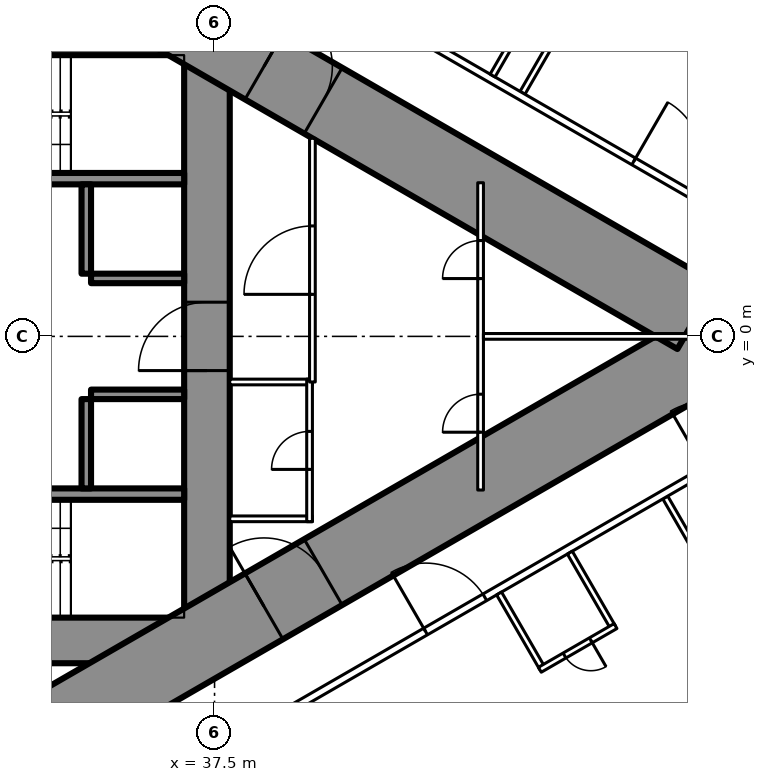
"""IFC4 building model, lengths in metres.
Left out: names, types, materials, properties, quantities, classifications, styles, units other than length and angle.
Written with IfcOpenShell. Run it as: python <this file> out.ifc"""

import sys

from ifc_helpers import new_model, si_unit, direction, frame, frame_2d, origin, place, context, subcontext, project, spatial, rectangle, extrude, element, fill, save


model = new_model("IFC4")
c1 = context("Model", 3, precision=1e-05, world=origin(), true_north=direction((0.0, 1.0)))
c2 = subcontext(c1, "Body", "Model", "MODEL_VIEW")
j1 = project(units=[si_unit("LENGTHUNIT", "METRE"), si_unit("PLANEANGLEUNIT", "RADIAN")], contexts=[c1])
p1 = place(None, origin())
s1 = spatial("IfcSite", under=j1, at=p1, CompositionType="ELEMENT")
p2 = place(p1, origin())
s2 = spatial("IfcBuilding", under=s1, at=p2, CompositionType="ELEMENT")
p3 = place(p2, frame((0.0, 0.0, 12.6)))
s3 = spatial("IfcBuildingStorey", under=s2, at=p3, CompositionType="ELEMENT", Elevation=12.6)
p4 = place(p3, frame((37.3, -8.6, 0.0), z_axis=(0.0, 0.0, 1.0), x_axis=(0.0, 1.0, 0.0)))
e1 = element("IfcWall", 1, at=p4, inside=s3, PredefinedType="SHEAR", context=c2, shape_type="SweptSolid", body=[
    extrude(rectangle(XDim=17.2, YDim=1.2, at=frame_2d((8.6, 0.0))), origin(), (0.0, 0.0, 1.0), 5.4),
])
p5 = place(p4, frame((7.7, 0.0, 0.0)))
e2 = element("IfcOpeningElement", 2, at=p5, cuts=e1, PredefinedType="OPENING", context=c2, shape_type="SweptSolid", body=[
    extrude(rectangle(XDim=1.8, YDim=2.2, at=frame_2d((0.9, 1.1))), frame((0.0, 0.61, 0.0), z_axis=(0.0, -1.0, 0.0), x_axis=(1.0, 0.0, 0.0)), (0.0, 0.0, 1.0), 1.22),
])
p6 = place(p3, frame((28.3, -8.0, 0.0), z_axis=(0.0, 0.0, 1.0), x_axis=(1.0, 0.0, 0.0)))
e3 = element("IfcWall", 3, at=p6, inside=s3, PredefinedType="SHEAR", context=c2, shape_type="SweptSolid", body=[
    extrude(rectangle(XDim=8.4, YDim=1.2, at=frame_2d((4.2, 0.0))), origin(), (0.0, 0.0, 1.0), 5.4),
])
p7 = place(p6, frame((0.25, 0.0, 0.0)))
e4 = element("IfcOpeningElement", 4, at=p7, cuts=e3, PredefinedType="OPENING", context=c2, shape_type="SweptSolid", body=[
    extrude(rectangle(XDim=1.0, YDim=2.2, at=frame_2d((0.5, 1.1))), frame((0.0, 0.61, 0.0), z_axis=(0.0, -1.0, 0.0), x_axis=(1.0, 0.0, 0.0)), (0.0, 0.0, 1.0), 1.22),
])
p8 = place(p3, frame((28.3, 8.0, 0.0), z_axis=(0.0, 0.0, 1.0), x_axis=(1.0, 0.0, 0.0)))
e5 = element("IfcWall", 5, at=p8, inside=s3, PredefinedType="SHEAR", context=c2, shape_type="SweptSolid", body=[
    extrude(rectangle(XDim=8.4, YDim=1.2, at=frame_2d((4.2, 0.0))), origin(), (0.0, 0.0, 1.0), 5.4),
])
p9 = place(p8, frame((0.25, 0.0, 0.0)))
e6 = element("IfcOpeningElement", 6, at=p9, cuts=e5, PredefinedType="OPENING", context=c2, shape_type="SweptSolid", body=[
    extrude(rectangle(XDim=1.0, YDim=2.2, at=frame_2d((0.5, 1.1))), frame((0.0, 0.61, 0.0), z_axis=(0.0, -1.0, 0.0), x_axis=(1.0, 0.0, 0.0)), (0.0, 0.0, 1.0), 1.22),
])
for number, where, z_axis, x_axis in (
    (7, (28.3, -4.15, 0.0), (0.0, 0.0, 1.0), (1.0, 0.0, 0.0)),
    (8, (28.3, 4.15, 0.0), (0.0, 0.0, 1.0), (1.0, 0.0, 0.0)),
):
    element("IfcWall", number, at=place(p3, frame(where, z_axis=z_axis, x_axis=x_axis)), inside=s3, PredefinedType="SHEAR", context=c2, shape_type="SweptSolid", body=[
        extrude(rectangle(XDim=8.4, YDim=0.3, at=frame_2d((4.2, 0.0))), origin(), (0.0, 0.0, 1.0), 5.4),
    ])
p10 = place(p3, frame((34.125, -4.0, 0.0), z_axis=(0.0, 0.0, 1.0), x_axis=(0.0, 1.0, 0.0)))
e9 = element("IfcWall", 9, at=p10, inside=s3, PredefinedType="SHEAR", context=c2, shape_type="SweptSolid", body=[
    extrude(rectangle(XDim=2.35, YDim=0.25, at=frame_2d((1.175, 0.0))), origin(), (0.0, 0.0, 1.0), 5.4),
])
p11 = place(p3, frame((34.25, -1.525, 0.0), z_axis=(0.0, 0.0, 1.0), x_axis=(1.0, 0.0, 0.0)))
e10 = element("IfcWall", 10, at=p11, inside=s3, PredefinedType="SHEAR", context=c2, shape_type="SweptSolid", body=[
    extrude(rectangle(XDim=2.45, YDim=0.25, at=frame_2d((1.225, 0.0))), origin(), (0.0, 0.0, 1.0), 5.4),
])
p12 = place(p3, frame((34.125, 1.65, 0.0), z_axis=(0.0, 0.0, 1.0), x_axis=(0.0, 1.0, 0.0)))
e11 = element("IfcWall", 11, at=p12, inside=s3, PredefinedType="SHEAR", context=c2, shape_type="SweptSolid", body=[
    extrude(rectangle(XDim=2.35, YDim=0.25, at=frame_2d((1.175, 0.0))), origin(), (0.0, 0.0, 1.0), 5.4),
])
p13 = place(p3, frame((34.25, 1.525, 0.0), z_axis=(0.0, 0.0, 1.0), x_axis=(1.0, 0.0, 0.0)))
e12 = element("IfcWall", 12, at=p13, inside=s3, PredefinedType="SHEAR", context=c2, shape_type="SweptSolid", body=[
    extrude(rectangle(XDim=2.45, YDim=0.25, at=frame_2d((1.225, 0.0))), origin(), (0.0, 0.0, 1.0), 5.4),
])
p14 = place(p3, frame((27.2, -13.8, 0.0), z_axis=(0.0, 0.0, 1.0), x_axis=(0.866027159892, 0.499996958321, 0.0)))
e13 = element("IfcWall", 13, at=p14, inside=s3, PredefinedType="SHEAR", context=c2, shape_type="SweptSolid", body=[
    extrude(rectangle(XDim=27.947, YDim=2.0, at=frame_2d((13.973, 0.0))), origin(), (0.0, 0.0, 1.0), 5.4),
])
p15 = place(p14, frame((4.6, 0.0, 0.0)))
e14 = element("IfcOpeningElement", 14, at=p15, cuts=e13, PredefinedType="OPENING", context=c2, shape_type="SweptSolid", body=[
    extrude(rectangle(XDim=1.0, YDim=2.2, at=frame_2d((0.5, 1.1))), frame((0.0, 1.01, 0.0), z_axis=(0.0, -1.0, 0.0), x_axis=(1.0, 0.0, 0.0)), (0.0, 0.0, 1.0), 2.02),
])
p16 = place(p14, frame((13.395, 0.0, 0.0)))
e15 = element("IfcOpeningElement", 15, at=p16, cuts=e13, PredefinedType="OPENING", context=c2, shape_type="SweptSolid", body=[
    extrude(rectangle(XDim=1.8, YDim=2.2, at=frame_2d((0.9, 1.1))), frame((0.0, 1.01, 0.0), z_axis=(0.0, -1.0, 0.0), x_axis=(1.0, 0.0, 0.0)), (0.0, 0.0, 1.0), 2.02),
])
p17 = place(p3, frame((27.2, 13.8, 0.0), z_axis=(0.0, 0.0, 1.0), x_axis=(0.866024545924, -0.500001485854, 0.0)))
e16 = element("IfcWall", 16, at=p17, inside=s3, PredefinedType="SHEAR", context=c2, shape_type="SweptSolid", body=[
    extrude(rectangle(XDim=26.534, YDim=2.0, at=frame_2d((13.267, 0.0))), origin(), (0.0, 0.0, 1.0), 5.4),
])
p18 = place(p17, frame((4.6, 0.0, 0.0)))
e17 = element("IfcOpeningElement", 17, at=p18, cuts=e16, PredefinedType="OPENING", context=c2, shape_type="SweptSolid", body=[
    extrude(rectangle(XDim=1.0, YDim=2.2, at=frame_2d((0.5, 1.1))), frame((0.0, 1.01, 0.0), z_axis=(0.0, -1.0, 0.0), x_axis=(1.0, 0.0, 0.0)), (0.0, 0.0, 1.0), 2.02),
])
p19 = place(p17, frame((13.395, 0.0, 0.0)))
e18 = element("IfcOpeningElement", 18, at=p19, cuts=e16, PredefinedType="OPENING", context=c2, shape_type="SweptSolid", body=[
    extrude(rectangle(XDim=1.8, YDim=2.2, at=frame_2d((0.9, 1.1))), frame((0.0, 1.01, 0.0), z_axis=(0.0, -1.0, 0.0), x_axis=(1.0, 0.0, 0.0)), (0.0, 0.0, 1.0), 2.02),
])
p20 = place(p3, frame((49.36, -4.239, 0.0), z_axis=(0.0, 0.0, 1.0), x_axis=(0.499984446848, -0.866034383215, 0.0)))
e19 = element("IfcWall", 19, at=p20, inside=s3, PredefinedType="PARTITIONING", context=c2, shape_type="SweptSolid", body=[
    extrude(rectangle(XDim=9.491, YDim=0.15, at=frame_2d((4.746, 0.0))), origin(), (0.0, 0.0, 1.0), 4.15),
])
p21 = place(p3, frame((45.603, 6.408, 0.0), z_axis=(0.0, 0.0, 1.0), x_axis=(0.499999740363, 0.866025553686, 0.0)))
e20 = element("IfcWall", 20, at=p21, inside=s3, PredefinedType="PARTITIONING", context=c2, shape_type="SweptSolid", body=[
    extrude(rectangle(XDim=9.501, YDim=0.15, at=frame_2d((4.751, 0.0))), origin(), (0.0, 0.0, 1.0), 4.15),
])
p22 = place(p3, frame((38.16, -10.59, 0.0), z_axis=(0.0, 0.0, 1.0), x_axis=(0.866027029586, 0.499997184019, 0.0)))
e21 = element("IfcWall", 21, at=p22, inside=s3, PredefinedType="PARTITIONING", context=c2, shape_type="SweptSolid", body=[
    extrude(rectangle(XDim=21.18, YDim=0.2, at=frame_2d((10.59, 0.0))), origin(), (0.0, 0.0, 1.0), 4.25),
])
p23 = place(p22, frame((14.142, 0.0, 0.0)))
e22 = element("IfcOpeningElement", 22, at=p23, cuts=e21, PredefinedType="OPENING", context=c2, shape_type="SweptSolid", body=[
    extrude(rectangle(XDim=1.8, YDim=2.2, at=frame_2d((0.9, 1.1))), frame((0.0, 0.11, 0.0), z_axis=(0.0, -1.0, 0.0), x_axis=(1.0, 0.0, 0.0)), (0.0, 0.0, 1.0), 0.22),
])
p24 = place(p22, frame((18.183, 0.0, 0.0)))
e23 = element("IfcOpeningElement", 23, at=p24, cuts=e21, PredefinedType="OPENING", context=c2, shape_type="SweptSolid", body=[
    extrude(rectangle(XDim=1.8, YDim=2.2, at=frame_2d((0.9, 1.1))), frame((0.0, 0.11, 0.0), z_axis=(0.0, -1.0, 0.0), x_axis=(1.0, 0.0, 0.0)), (0.0, 0.0, 1.0), 0.22),
])
p25 = place(p22, frame((5.65, 0.0, 0.0)))
e24 = element("IfcOpeningElement", 24, at=p25, cuts=e21, PredefinedType="OPENING", context=c2, shape_type="SweptSolid", body=[
    extrude(rectangle(XDim=1.8, YDim=2.2, at=frame_2d((0.9, 1.1))), frame((0.0, 0.11, 0.0), z_axis=(0.0, -1.0, 0.0), x_axis=(1.0, 0.0, 0.0)), (0.0, 0.0, 1.0), 0.22),
])
p26 = place(p3, frame((37.034, 11.24, 0.0), z_axis=(0.0, 0.0, 1.0), x_axis=(0.866025942536, -0.499999066854, 0.0)))
e25 = element("IfcWall", 25, at=p26, inside=s3, PredefinedType="PARTITIONING", context=c2, shape_type="SweptSolid", body=[
    extrude(rectangle(XDim=22.36, YDim=0.2, at=frame_2d((11.18, 0.0))), origin(), (0.0, 0.0, 1.0), 4.25),
])
p27 = place(p26, frame((19.423, 0.0, 0.0)))
e26 = element("IfcOpeningElement", 26, at=p27, cuts=e25, PredefinedType="OPENING", context=c2, shape_type="SweptSolid", body=[
    extrude(rectangle(XDim=1.8, YDim=2.2, at=frame_2d((0.9, 1.1))), frame((0.0, 0.11, 0.0), z_axis=(0.0, -1.0, 0.0), x_axis=(1.0, 0.0, 0.0)), (0.0, 0.0, 1.0), 0.22),
])
p28 = place(p26, frame((13.274, 0.0, 0.0)))
e27 = element("IfcOpeningElement", 27, at=p28, cuts=e25, PredefinedType="OPENING", context=c2, shape_type="SweptSolid", body=[
    extrude(rectangle(XDim=1.8, YDim=2.2, at=frame_2d((0.9, 1.1))), frame((0.0, 0.11, 0.0), z_axis=(0.0, -1.0, 0.0), x_axis=(1.0, 0.0, 0.0)), (0.0, 0.0, 1.0), 0.22),
])
p29 = place(p26, frame((4.602, 0.0, 0.0)))
e28 = element("IfcOpeningElement", 28, at=p29, cuts=e25, PredefinedType="OPENING", context=c2, shape_type="SweptSolid", body=[
    extrude(rectangle(XDim=1.8, YDim=2.2, at=frame_2d((0.9, 1.1))), frame((0.0, 0.11, 0.0), z_axis=(0.0, -1.0, 0.0), x_axis=(1.0, 0.0, 0.0)), (0.0, 0.0, 1.0), 0.22),
])
for number, where, z_axis, x_axis in (
    (29, (37.9, -1.2, 0.0), (0.0, 0.0, 1.0), (1.0, 0.0, 0.0)),
    (30, (37.9, -4.8, 0.0), (0.0, 0.0, 1.0), (1.0, 0.0, 0.0)),
):
    element("IfcWall", number, at=place(p3, frame(where, z_axis=z_axis, x_axis=x_axis)), inside=s3, PredefinedType="PARTITIONING", context=c2, shape_type="SweptSolid", body=[
        extrude(rectangle(XDim=2.175, YDim=0.15, at=frame_2d((1.087, 0.0))), origin(), (0.0, 0.0, 1.0), 5.15),
    ])
p30 = place(p3, frame((40.0, -4.875, 0.0), z_axis=(0.0, 0.0, 1.0), x_axis=(0.0, 1.0, 0.0)))
e31 = element("IfcWall", 31, at=p30, inside=s3, PredefinedType="PARTITIONING", context=c2, shape_type="SweptSolid", body=[
    extrude(rectangle(XDim=3.75, YDim=0.15, at=frame_2d((1.875, 0.0))), origin(), (0.0, 0.0, 1.0), 5.15),
])
p31 = place(p30, frame((1.375, 0.0, 0.0)))
e32 = element("IfcOpeningElement", 32, at=p31, cuts=e31, PredefinedType="OPENING", context=c2, shape_type="SweptSolid", body=[
    extrude(rectangle(XDim=1.0, YDim=2.2, at=frame_2d((0.5, 1.1))), frame((0.0, 0.085, 0.0), z_axis=(0.0, -1.0, 0.0), x_axis=(1.0, 0.0, 0.0)), (0.0, 0.0, 1.0), 0.17),
])
p32 = place(p3, frame((40.075, -1.2, 0.0), z_axis=(0.0, 0.0, 1.0), x_axis=(0.0, 1.0, 0.0)))
e33 = element("IfcWall", 33, at=p32, inside=s3, PredefinedType="PARTITIONING", context=c2, shape_type="SweptSolid", body=[
    extrude(rectangle(XDim=6.412, YDim=0.15, at=frame_2d((3.206, 0.0))), origin(), (0.0, 0.0, 1.0), 5.15),
])
p33 = place(p32, frame((2.306, 0.0, 0.0)))
e34 = element("IfcOpeningElement", 34, at=p33, cuts=e33, PredefinedType="OPENING", context=c2, shape_type="SweptSolid", body=[
    extrude(rectangle(XDim=1.8, YDim=2.2, at=frame_2d((0.9, 1.1))), frame((0.0, 0.085, 0.0), z_axis=(0.0, -1.0, 0.0), x_axis=(1.0, 0.0, 0.0)), (0.0, 0.0, 1.0), 0.17),
])
p34 = place(p3, frame((44.5, -4.043, 0.0), z_axis=(0.0, 0.0, 1.0), x_axis=(0.0, 1.0, 0.0)))
e35 = element("IfcWall", 35, at=p34, inside=s3, PredefinedType="PARTITIONING", context=c2, shape_type="SweptSolid", body=[
    extrude(rectangle(XDim=8.085, YDim=0.15, at=frame_2d((4.043, 0.0))), origin(), (0.0, 0.0, 1.0), 4.25),
])
p35 = place(p34, frame((1.521, 0.0, 0.0)))
e36 = element("IfcOpeningElement", 36, at=p35, cuts=e35, PredefinedType="OPENING", context=c2, shape_type="SweptSolid", body=[
    extrude(rectangle(XDim=1.0, YDim=2.2, at=frame_2d((0.5, 1.1))), frame((0.0, 0.085, 0.0), z_axis=(0.0, -1.0, 0.0), x_axis=(1.0, 0.0, 0.0)), (0.0, 0.0, 1.0), 0.17),
])
p36 = place(p34, frame((5.564, 0.0, 0.0)))
e37 = element("IfcOpeningElement", 37, at=p36, cuts=e35, PredefinedType="OPENING", context=c2, shape_type="SweptSolid", body=[
    extrude(rectangle(XDim=1.0, YDim=2.2, at=frame_2d((0.5, 1.1))), frame((0.0, 0.085, 0.0), z_axis=(0.0, -1.0, 0.0), x_axis=(1.0, 0.0, 0.0)), (0.0, 0.0, 1.0), 0.17),
])
p37 = place(p3, frame((44.575, 0.0, 0.0), z_axis=(0.0, 0.0, 1.0), x_axis=(1.0, 0.0, 0.0)))
e38 = element("IfcWall", 38, at=p37, inside=s3, PredefinedType="PARTITIONING", context=c2, shape_type="SweptSolid", body=[
    extrude(rectangle(XDim=7.727, YDim=0.15, at=frame_2d((3.864, 0.0))), origin(), (0.0, 0.0, 1.0), 4.15),
])
for number, where, z_axis, x_axis in (
    (39, (44.815, 6.863, 0.0), (0.0, 0.0, 1.0), (0.5, 0.866, 0.0)),
    (40, (44.986, -6.764, 0.0), (0.0, 0.0, 1.0), (0.5, -0.866, 0.0)),
    (41, (46.848, -5.689, 0.0), (0.0, 0.0, 1.0), (0.5, -0.866, 0.0)),
):
    element("IfcWall", number, at=place(p3, frame(where, z_axis=z_axis, x_axis=x_axis)), inside=s3, PredefinedType="PARTITIONING", context=c2, shape_type="SweptSolid", body=[
        extrude(rectangle(XDim=2.275, YDim=0.15, at=frame_2d((1.137, 0.0))), origin(), (0.0, 0.0, 1.0), 5.15),
    ])
p38 = place(p3, frame((46.059, -8.772, 0.0), z_axis=(0.0, 0.0, 1.0), x_axis=(0.866007057882, 0.500031774688, 0.0)))
e42 = element("IfcWall", 42, at=p38, inside=s3, PredefinedType="PARTITIONING", context=c2, shape_type="SweptSolid", body=[
    extrude(rectangle(XDim=2.3, YDim=0.15, at=frame_2d((1.15, 0.0))), origin(), (0.0, 0.0, 1.0), 5.15),
])
p39 = place(p38, frame((0.75, 0.0, 0.0)))
e43 = element("IfcOpeningElement", 43, at=p39, cuts=e42, PredefinedType="OPENING", context=c2, shape_type="SweptSolid", body=[
    extrude(rectangle(XDim=0.8, YDim=2.2, at=frame_2d((0.4, 1.1))), frame((0.0, 0.085, 0.0), z_axis=(0.0, -1.0, 0.0), x_axis=(1.0, 0.0, 0.0)), (0.0, 0.0, 1.0), 0.17),
])
p40 = place(p28, origin())
e44 = element("IfcDoor", 44, at=p40, inside=s3, OperationType="DOUBLE_DOOR_SINGLE_SWING", PredefinedType="DOOR", context=c2, shape_type="SweptSolid", body=[
    extrude(rectangle(XDim=1.8, YDim=2.2, at=frame_2d((0.9, 1.1))), frame((0.0, 0.025, 0.0), z_axis=(0.0, -1.0, 0.0), x_axis=(1.0, 0.0, 0.0)), (0.0, 0.0, 1.0), 0.05),
])
fill(e27, e44)
p41 = place(p25, origin())
e45 = element("IfcDoor", 45, at=p41, inside=s3, OperationType="DOUBLE_DOOR_SINGLE_SWING", PredefinedType="DOOR", context=c2, shape_type="SweptSolid", body=[
    extrude(rectangle(XDim=1.8, YDim=2.2, at=frame_2d((0.9, 1.1))), frame((0.0, 0.025, 0.0), z_axis=(0.0, -1.0, 0.0), x_axis=(1.0, 0.0, 0.0)), (0.0, 0.0, 1.0), 0.05),
])
fill(e24, e45)
p42 = place(p31, origin())
e46 = element("IfcDoor", 46, at=p42, inside=s3, OperationType="SINGLE_SWING_LEFT", PredefinedType="DOOR", context=c2, shape_type="SweptSolid", body=[
    extrude(rectangle(XDim=1.0, YDim=2.2, at=frame_2d((0.5, 1.1))), frame((0.0, 0.025, 0.0), z_axis=(0.0, -1.0, 0.0), x_axis=(1.0, 0.0, 0.0)), (0.0, 0.0, 1.0), 0.05),
])
fill(e32, e46)
p43 = place(p33, origin())
e47 = element("IfcDoor", 47, at=p43, inside=s3, OperationType="DOUBLE_DOOR_SINGLE_SWING", PredefinedType="DOOR", context=c2, shape_type="SweptSolid", body=[
    extrude(rectangle(XDim=1.8, YDim=2.2, at=frame_2d((0.9, 1.1))), frame((0.0, 0.025, 0.0), z_axis=(0.0, -1.0, 0.0), x_axis=(1.0, 0.0, 0.0)), (0.0, 0.0, 1.0), 0.05),
])
fill(e34, e47)
p44 = place(p35, origin())
e48 = element("IfcDoor", 48, at=p44, inside=s3, OperationType="SINGLE_SWING_LEFT", PredefinedType="DOOR", context=c2, shape_type="SweptSolid", body=[
    extrude(rectangle(XDim=1.0, YDim=2.2, at=frame_2d((0.5, 1.1))), frame((0.0, 0.025, 0.0), z_axis=(0.0, -1.0, 0.0), x_axis=(1.0, 0.0, 0.0)), (0.0, 0.0, 1.0), 0.05),
])
fill(e36, e48)
p45 = place(p36, origin())
e49 = element("IfcDoor", 49, at=p45, inside=s3, OperationType="SINGLE_SWING_LEFT", PredefinedType="DOOR", context=c2, shape_type="SweptSolid", body=[
    extrude(rectangle(XDim=1.0, YDim=2.2, at=frame_2d((0.5, 1.1))), frame((0.0, 0.025, 0.0), z_axis=(0.0, -1.0, 0.0), x_axis=(1.0, 0.0, 0.0)), (0.0, 0.0, 1.0), 0.05),
])
fill(e37, e49)
p46 = place(p16, origin())
e50 = element("IfcDoor", 50, at=p46, inside=s3, OperationType="DOUBLE_DOOR_SINGLE_SWING", PredefinedType="DOOR", context=c2, shape_type="SweptSolid", body=[
    extrude(rectangle(XDim=1.8, YDim=2.2, at=frame_2d((0.9, 1.1))), frame((0.0, 0.025, 0.0), z_axis=(0.0, -1.0, 0.0), x_axis=(1.0, 0.0, 0.0)), (0.0, 0.0, 1.0), 0.05),
])
fill(e15, e50)
p47 = place(p19, origin())
e51 = element("IfcDoor", 51, at=p47, inside=s3, OperationType="DOUBLE_DOOR_SINGLE_SWING", PredefinedType="DOOR", context=c2, shape_type="SweptSolid", body=[
    extrude(rectangle(XDim=1.8, YDim=2.2, at=frame_2d((0.9, 1.1))), frame((0.0, 0.025, 0.0), z_axis=(0.0, -1.0, 0.0), x_axis=(1.0, 0.0, 0.0)), (0.0, 0.0, 1.0), 0.05),
])
fill(e18, e51)
p48 = place(p5, origin())
e52 = element("IfcDoor", 52, at=p48, inside=s3, OperationType="DOUBLE_DOOR_SINGLE_SWING", PredefinedType="DOOR", context=c2, shape_type="SweptSolid", body=[
    extrude(rectangle(XDim=1.8, YDim=2.2, at=frame_2d((0.9, 1.1))), frame((0.0, 0.025, 0.0), z_axis=(0.0, -1.0, 0.0), x_axis=(1.0, 0.0, 0.0)), (0.0, 0.0, 1.0), 0.05),
])
fill(e2, e52)
p49 = place(p39, origin())
e53 = element("IfcDoor", 53, at=p49, inside=s3, OperationType="SINGLE_SWING_RIGHT", PredefinedType="DOOR", context=c2, shape_type="SweptSolid", body=[
    extrude(rectangle(XDim=0.8, YDim=2.2, at=frame_2d((0.4, 1.1))), frame((0.0, 0.025, 0.0), z_axis=(0.0, -1.0, 0.0), x_axis=(1.0, 0.0, 0.0)), (0.0, 0.0, 1.0), 0.05),
])
fill(e43, e53)
save(model, sys.argv[1])
